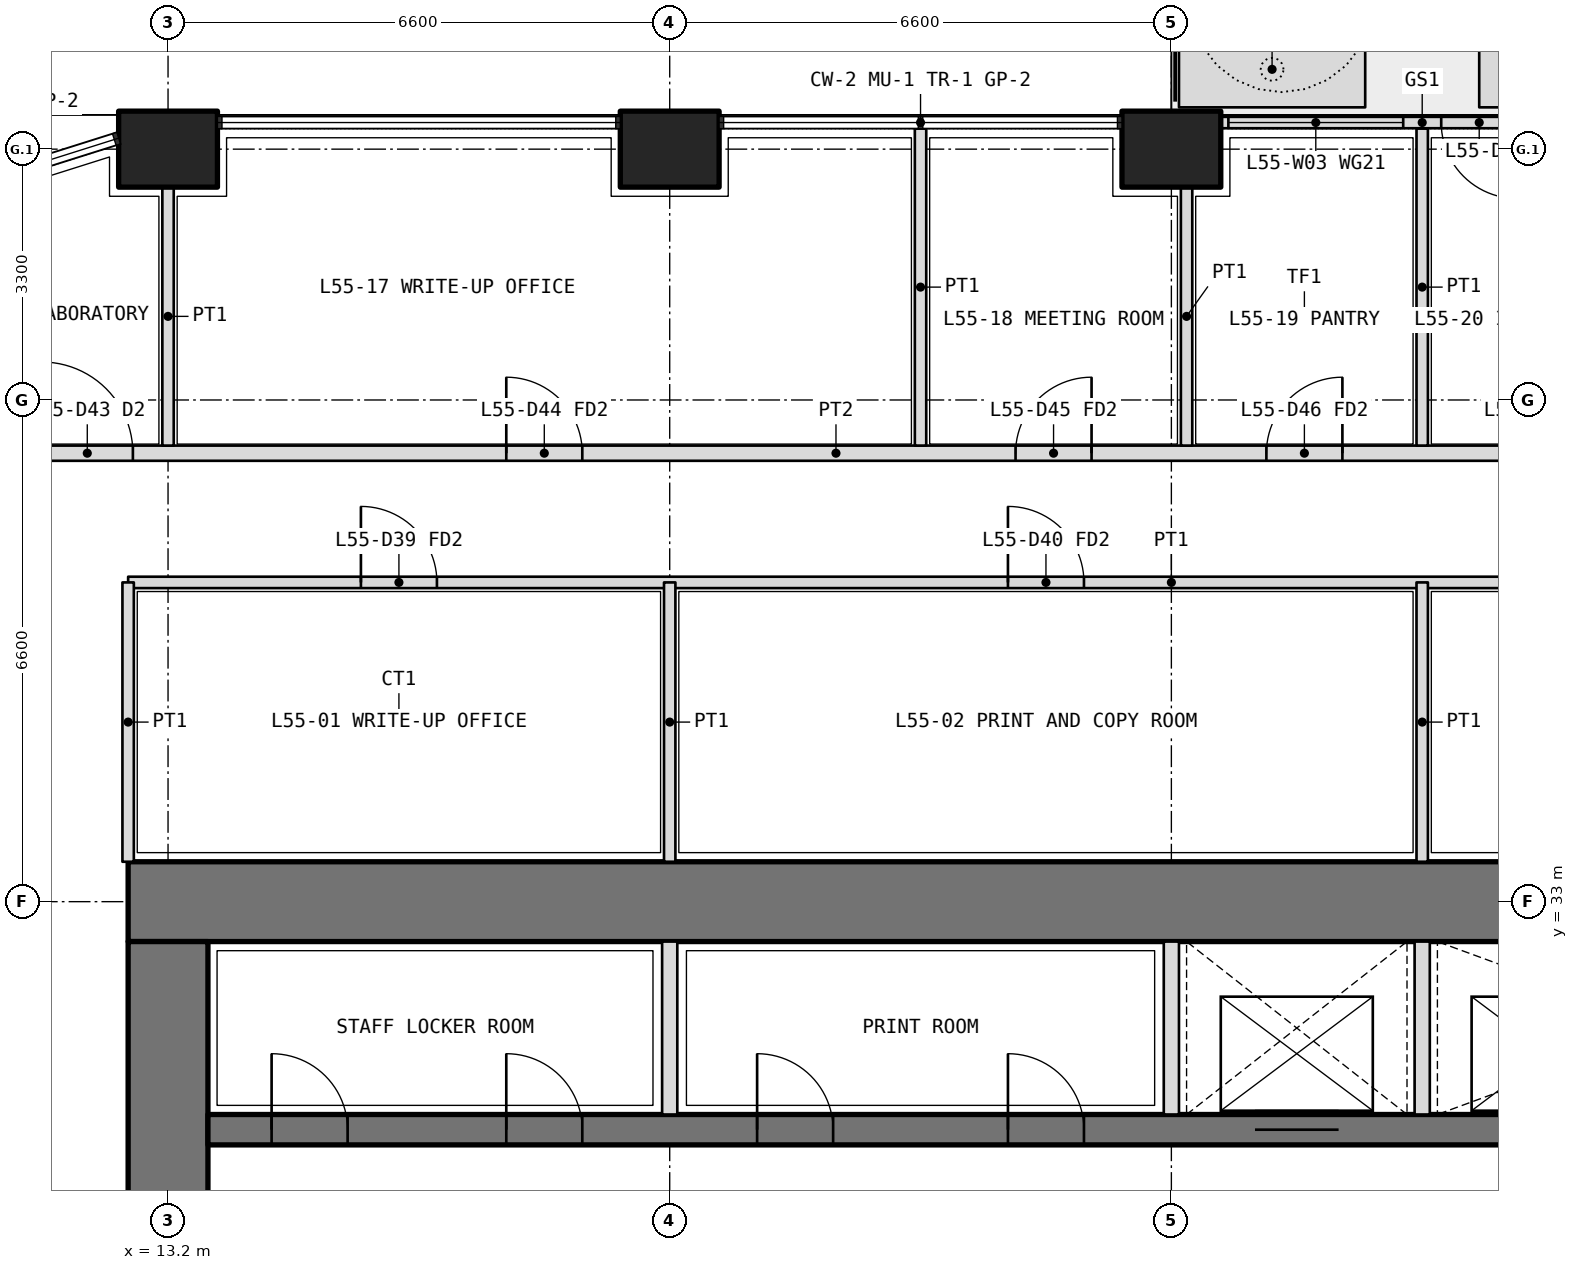
"""IFC4 building model, lengths in metres.
Left out: names, types, materials, properties, quantities, classifications, styles, units other than length and angle.
Written with IfcOpenShell. Run it as: python <this file> out.ifc"""

import sys

from ifc_helpers import new_model, si_unit, direction, frame, frame_2d, origin, origin_2d, place, context, subcontext, project, spatial, polyline, rectangle, outline, extrude, element, fill, save


model = new_model("IFC4")
c1 = context("Model", 3, precision=1e-05, world=origin(), true_north=direction((0.0, 1.0)))
c2 = subcontext(c1, "Body", "Model", "MODEL_VIEW")
j1 = project(units=[si_unit("LENGTHUNIT", "METRE"), si_unit("PLANEANGLEUNIT", "RADIAN")], contexts=[c1])
p1 = place(None, origin())
s1 = spatial("IfcSite", under=j1, at=p1, CompositionType="ELEMENT")
p2 = place(p1, origin())
s2 = spatial("IfcBuilding", under=s1, at=p2, CompositionType="ELEMENT")
p3 = place(p2, frame((0.0, 0.0, 241.8)))
s3 = spatial("IfcBuildingStorey", under=s2, at=p3, CompositionType="ELEMENT", Elevation=241.8)
for number, where, z_axis, x_axis in (
    (1, (13.2, 42.9, 0.0), (0.0, 0.0, 1.0), (1.0, 0.0, 0.0)),
    (2, (19.8, 42.9, 0.0), (0.0, 0.0, 1.0), (1.0, 0.0, 0.0)),
    (3, (26.4, 42.9, 0.0), (0.0, 0.0, 1.0), (1.0, 0.0, 0.0)),
):
    element("IfcColumn", number, at=place(p3, frame(where, z_axis=z_axis, x_axis=x_axis)), inside=s3, PredefinedType="COLUMN", context=c2, shape_type="SweptSolid", body=[
        extrude(rectangle(XDim=1.3, YDim=1.0, at=origin_2d()), origin(), (0.0, 0.0, 1.0), 4.2),
    ])
p4 = place(p3, origin())
e4 = element("IfcWall", 4, at=p4, inside=s3, PredefinedType="USERDEFINED", context=c2, shape_type="SweptSolid", body=[
    extrude(outline(polyline([(26.5, 43.45), (28.95, 43.45), (28.95, 44.45), (26.5, 44.45), (26.5, 43.45)]), holes=[polyline([(26.65, 43.6), (28.8, 43.6), (28.8, 44.3), (26.65, 44.3), (26.65, 43.6)])]), origin(), (0.0, 0.0, 1.0), 1.05),
])
p5 = place(p3, origin())
e5 = element("IfcWall", 5, at=p5, inside=s3, PredefinedType="USERDEFINED", context=c2, shape_type="SweptSolid", body=[
    extrude(outline(polyline([(30.45, 43.45), (39.5, 43.45), (39.5, 44.45), (30.45, 44.45), (30.45, 43.45)]), holes=[polyline([(30.6, 43.6), (39.35, 43.6), (39.35, 44.3), (30.6, 44.3), (30.6, 43.6)])]), origin(), (0.0, 0.0, 1.0), 1.05),
])
p6 = place(p3, frame((32.35, 43.25, 0.0), z_axis=(0.0, 0.0, 1.0), x_axis=(-1.0, 0.0, 0.0)))
e6 = element("IfcWall", 6, at=p6, inside=s3, PredefinedType="SOLIDWALL", context=c2, shape_type="SweptSolid", body=[
    extrude(rectangle(XDim=5.3, YDim=0.15, at=frame_2d((2.65, 0.0))), origin(), (0.0, 0.0, 1.0), 2.7),
])
p7 = place(p6, frame((1.4, 0.0, 0.0)))
e7 = element("IfcOpeningElement", 7, at=p7, cuts=e6, PredefinedType="OPENING", context=c2, shape_type="SweptSolid", body=[
    extrude(rectangle(XDim=1.0, YDim=2.4, at=frame_2d((0.5, 1.2))), frame((0.0, 0.085, 0.0), z_axis=(0.0, -1.0, 0.0), x_axis=(1.0, 0.0, 0.0)), (0.0, 0.0, 1.0), 0.17),
])
p8 = place(p6, frame((0.1, 0.0, 0.1)))
e8 = element("IfcOpeningElement", 8, at=p8, cuts=e6, PredefinedType="OPENING", context=c2, shape_type="SweptSolid", body=[
    extrude(rectangle(XDim=1.2, YDim=2.3, at=frame_2d((0.6, 1.15))), frame((0.0, 0.085, 0.0), z_axis=(0.0, -1.0, 0.0), x_axis=(1.0, 0.0, 0.0)), (0.0, 0.0, 1.0), 0.17),
])
p9 = place(p6, frame((2.9, 0.0, 0.1)))
e9 = element("IfcOpeningElement", 9, at=p9, cuts=e6, PredefinedType="OPENING", context=c2, shape_type="SweptSolid", body=[
    extrude(rectangle(XDim=2.3, YDim=2.3, at=frame_2d((1.15, 1.15))), frame((0.0, 0.085, 0.0), z_axis=(0.0, -1.0, 0.0), x_axis=(1.0, 0.0, 0.0)), (0.0, 0.0, 1.0), 0.17),
])
p10 = place(p3, frame((40.125, 33.0, 0.0), z_axis=(0.0, 0.0, 1.0), x_axis=(-1.0, 0.0, 0.0)))
e10 = element("IfcWall", 10, at=p10, inside=s3, PredefinedType="SHEAR", context=c2, shape_type="SweptSolid", body=[
    extrude(rectangle(XDim=27.45, YDim=1.05, at=frame_2d((13.725, 0.0))), origin(), (0.0, 0.0, 1.0), 4.2),
])
p11 = place(p3, frame((13.2, 32.475, 0.0), z_axis=(0.0, 0.0, 1.0), x_axis=(0.0, -1.0, 0.0)))
e11 = element("IfcWall", 11, at=p11, inside=s3, PredefinedType="SHEAR", context=c2, shape_type="SweptSolid", body=[
    extrude(rectangle(XDim=18.75, YDim=1.05, at=frame_2d((9.375, 0.0))), origin(), (0.0, 0.0, 1.0), 4.2),
])
p12 = place(p11, frame((14.125, 0.0, 0.0)))
e12 = element("IfcOpeningElement", 12, at=p12, cuts=e11, PredefinedType="OPENING", context=c2, shape_type="SweptSolid", body=[
    extrude(rectangle(XDim=1.6, YDim=2.1, at=frame_2d((0.8, 1.05))), frame((0.0, 0.535, 0.0), z_axis=(0.0, -1.0, 0.0), x_axis=(1.0, 0.0, 0.0)), (0.0, 0.0, 1.0), 1.07),
])
p13 = place(p11, frame((3.325, 0.0, 0.0)))
e13 = element("IfcOpeningElement", 13, at=p13, cuts=e11, PredefinedType="OPENING", context=c2, shape_type="SweptSolid", body=[
    extrude(rectangle(XDim=1.6, YDim=2.1, at=frame_2d((0.8, 1.05))), frame((0.0, 0.535, 0.0), z_axis=(0.0, -1.0, 0.0), x_axis=(1.0, 0.0, 0.0)), (0.0, 0.0, 1.0), 1.07),
])
p14 = place(p3, frame((13.725, 30.0, 0.0), z_axis=(0.0, 0.0, 1.0), x_axis=(1.0, 0.0, 0.0)))
e14 = element("IfcWall", 14, at=p14, inside=s3, PredefinedType="SHEAR", context=c2, shape_type="SweptSolid", body=[
    extrude(rectangle(XDim=25.35, YDim=0.4, at=frame_2d((12.675, 0.0))), origin(), (0.0, 0.0, 1.0), 4.2),
])
p15 = place(p14, frame((0.837, 0.0, 0.0)))
e15 = element("IfcOpeningElement", 15, at=p15, cuts=e14, PredefinedType="OPENING", context=c2, shape_type="SweptSolid", body=[
    extrude(rectangle(XDim=1.0, YDim=2.1, at=frame_2d((0.5, 1.05))), frame((0.0, 0.21, 0.0), z_axis=(0.0, -1.0, 0.0), x_axis=(1.0, 0.0, 0.0)), (0.0, 0.0, 1.0), 0.42),
])
p16 = place(p14, frame((3.925, 0.0, 0.0)))
e16 = element("IfcOpeningElement", 16, at=p16, cuts=e14, PredefinedType="OPENING", context=c2, shape_type="SweptSolid", body=[
    extrude(rectangle(XDim=1.0, YDim=2.1, at=frame_2d((0.5, 1.05))), frame((0.0, 0.21, 0.0), z_axis=(0.0, -1.0, 0.0), x_axis=(1.0, 0.0, 0.0)), (0.0, 0.0, 1.0), 0.42),
])
p17 = place(p14, frame((7.225, 0.0, 0.0)))
e17 = element("IfcOpeningElement", 17, at=p17, cuts=e14, PredefinedType="OPENING", context=c2, shape_type="SweptSolid", body=[
    extrude(rectangle(XDim=1.0, YDim=2.1, at=frame_2d((0.5, 1.05))), frame((0.0, 0.21, 0.0), z_axis=(0.0, -1.0, 0.0), x_axis=(1.0, 0.0, 0.0)), (0.0, 0.0, 1.0), 0.42),
])
p18 = place(p14, frame((10.525, 0.0, 0.0)))
e18 = element("IfcOpeningElement", 18, at=p18, cuts=e14, PredefinedType="OPENING", context=c2, shape_type="SweptSolid", body=[
    extrude(rectangle(XDim=1.0, YDim=2.1, at=frame_2d((0.5, 1.05))), frame((0.0, 0.21, 0.0), z_axis=(0.0, -1.0, 0.0), x_axis=(1.0, 0.0, 0.0)), (0.0, 0.0, 1.0), 0.42),
])
p19 = place(p14, frame((13.775, 0.0, 0.0)))
e19 = element("IfcOpeningElement", 19, at=p19, cuts=e14, PredefinedType="OPENING", context=c2, shape_type="SweptSolid", body=[
    extrude(rectangle(XDim=1.1, YDim=2.1, at=frame_2d((0.55, 1.05))), frame((0.0, 0.21, 0.0), z_axis=(0.0, -1.0, 0.0), x_axis=(1.0, 0.0, 0.0)), (0.0, 0.0, 1.0), 0.42),
])
p20 = place(p14, frame((17.075, 0.0, 0.0)))
e20 = element("IfcOpeningElement", 20, at=p20, cuts=e14, PredefinedType="OPENING", context=c2, shape_type="SweptSolid", body=[
    extrude(rectangle(XDim=1.1, YDim=2.1, at=frame_2d((0.55, 1.05))), frame((0.0, 0.21, 0.0), z_axis=(0.0, -1.0, 0.0), x_axis=(1.0, 0.0, 0.0)), (0.0, 0.0, 1.0), 0.42),
])
p21 = place(p14, frame((20.375, 0.0, 0.0)))
e21 = element("IfcOpeningElement", 21, at=p21, cuts=e14, PredefinedType="OPENING", context=c2, shape_type="SweptSolid", body=[
    extrude(rectangle(XDim=1.1, YDim=2.1, at=frame_2d((0.55, 1.05))), frame((0.0, 0.21, 0.0), z_axis=(0.0, -1.0, 0.0), x_axis=(1.0, 0.0, 0.0)), (0.0, 0.0, 1.0), 0.42),
])
p22 = place(p14, frame((23.462, 0.0, 0.0)))
e22 = element("IfcOpeningElement", 22, at=p22, cuts=e14, PredefinedType="OPENING", context=c2, shape_type="SweptSolid", body=[
    extrude(rectangle(XDim=1.1, YDim=2.1, at=frame_2d((0.55, 1.05))), frame((0.0, 0.21, 0.0), z_axis=(0.0, -1.0, 0.0), x_axis=(1.0, 0.0, 0.0)), (0.0, 0.0, 1.0), 0.42),
])
for number, where, z_axis, x_axis in (
    (23, (19.8, 30.2, 0.0), (0.0, 0.0, 1.0), (0.0, 1.0, 0.0)),
    (24, (26.4, 30.2, 0.0), (0.0, 0.0, 1.0), (0.0, 1.0, 0.0)),
    (25, (29.7, 30.2, 0.0), (0.0, 0.0, 1.0), (0.0, 1.0, 0.0)),
):
    element("IfcWall", number, at=place(p3, frame(where, z_axis=z_axis, x_axis=x_axis)), inside=s3, PredefinedType="PARTITIONING", context=c2, shape_type="SweptSolid", body=[
        extrude(rectangle(XDim=2.275, YDim=0.2, at=frame_2d((1.138, 0.0))), origin(), (0.0, 0.0, 1.0), 4.2),
    ])
p23 = place(p3, frame((12.675, 37.2, 0.0), z_axis=(0.0, 0.0, 1.0), x_axis=(1.0, 0.0, 0.0)))
e26 = element("IfcWall", 26, at=p23, inside=s3, PredefinedType="PARTITIONING", context=c2, shape_type="SweptSolid", body=[
    extrude(rectangle(XDim=27.45, YDim=0.15, at=frame_2d((13.725, 0.0))), origin(), (0.0, 0.0, 1.0), 3.0),
])
p24 = place(p23, frame((3.062, 0.0, 0.0)))
e27 = element("IfcOpeningElement", 27, at=p24, cuts=e26, PredefinedType="OPENING", context=c2, shape_type="SweptSolid", body=[
    extrude(rectangle(XDim=1.0, YDim=2.1, at=frame_2d((0.5, 1.05))), frame((0.0, 0.085, 0.0), z_axis=(0.0, -1.0, 0.0), x_axis=(1.0, 0.0, 0.0)), (0.0, 0.0, 1.0), 0.17),
])
p25 = place(p23, frame((11.575, 0.0, 0.0)))
e28 = element("IfcOpeningElement", 28, at=p25, cuts=e26, PredefinedType="OPENING", context=c2, shape_type="SweptSolid", body=[
    extrude(rectangle(XDim=1.0, YDim=2.1, at=frame_2d((0.5, 1.05))), frame((0.0, 0.085, 0.0), z_axis=(0.0, -1.0, 0.0), x_axis=(1.0, 0.0, 0.0)), (0.0, 0.0, 1.0), 0.17),
])
p26 = place(p23, frame((19.825, 0.0, 0.0)))
e29 = element("IfcOpeningElement", 29, at=p26, cuts=e26, PredefinedType="OPENING", context=c2, shape_type="SweptSolid", body=[
    extrude(rectangle(XDim=1.0, YDim=2.1, at=frame_2d((0.5, 1.05))), frame((0.0, 0.085, 0.0), z_axis=(0.0, -1.0, 0.0), x_axis=(1.0, 0.0, 0.0)), (0.0, 0.0, 1.0), 0.17),
])
p27 = place(p23, frame((25.038, 0.0, 0.0)))
e30 = element("IfcOpeningElement", 30, at=p27, cuts=e26, PredefinedType="OPENING", context=c2, shape_type="SweptSolid", body=[
    extrude(rectangle(XDim=1.0, YDim=2.1, at=frame_2d((0.5, 1.05))), frame((0.0, 0.085, 0.0), z_axis=(0.0, -1.0, 0.0), x_axis=(1.0, 0.0, 0.0)), (0.0, 0.0, 1.0), 0.17),
])
for number, where, z_axis, x_axis in (
    (31, (12.675, 33.525, 0.0), (0.0, 0.0, 1.0), (0.0, 1.0, 0.0)),
    (32, (19.8, 33.525, 0.0), (0.0, 0.0, 1.0), (0.0, 1.0, 0.0)),
):
    element("IfcWall", number, at=place(p3, frame(where, z_axis=z_axis, x_axis=x_axis)), inside=s3, PredefinedType="PARTITIONING", context=c2, shape_type="SweptSolid", body=[
        extrude(rectangle(XDim=3.675, YDim=0.15, at=frame_2d((1.837, 0.0))), origin(), (0.0, 0.0, 1.0), 3.0),
    ])
p28 = place(p3, frame((29.7, 33.525, 0.0), z_axis=(0.0, 0.0, 1.0), x_axis=(0.0, 1.0, 0.0)))
e33 = element("IfcWall", 33, at=p28, inside=s3, PredefinedType="PARTITIONING", context=c2, shape_type="SweptSolid", body=[
    extrude(rectangle(XDim=3.675, YDim=0.15, at=frame_2d((1.837, 0.0))), origin(), (0.0, 0.0, 1.0), 3.9),
])
p29 = place(p3, frame((10.975, 38.9, 0.0), z_axis=(0.0, 0.0, 1.0), x_axis=(1.0, 0.0, 0.0)))
e34 = element("IfcWall", 34, at=p29, inside=s3, PredefinedType="PARTITIONING", context=c2, shape_type="SweptSolid", body=[
    extrude(rectangle(XDim=22.025, YDim=0.2, at=frame_2d((11.012, 0.0))), origin(), (0.0, 0.0, 1.0), 3.0),
])
p30 = place(p29, frame((0.562, 0.0, 0.0)))
e35 = element("IfcOpeningElement", 35, at=p30, cuts=e34, PredefinedType="OPENING", context=c2, shape_type="SweptSolid", body=[
    extrude(rectangle(XDim=1.2, YDim=2.1, at=frame_2d((0.6, 1.05))), frame((0.0, 0.11, 0.0), z_axis=(0.0, -1.0, 0.0), x_axis=(1.0, 0.0, 0.0)), (0.0, 0.0, 1.0), 0.22),
])
p31 = place(p29, frame((6.675, 0.0, 0.0)))
e36 = element("IfcOpeningElement", 36, at=p31, cuts=e34, PredefinedType="OPENING", context=c2, shape_type="SweptSolid", body=[
    extrude(rectangle(XDim=1.0, YDim=2.1, at=frame_2d((0.5, 1.05))), frame((0.0, 0.11, 0.0), z_axis=(0.0, -1.0, 0.0), x_axis=(1.0, 0.0, 0.0)), (0.0, 0.0, 1.0), 0.22),
])
p32 = place(p29, frame((13.375, 0.0, 0.0)))
e37 = element("IfcOpeningElement", 37, at=p32, cuts=e34, PredefinedType="OPENING", context=c2, shape_type="SweptSolid", body=[
    extrude(rectangle(XDim=1.0, YDim=2.1, at=frame_2d((0.5, 1.05))), frame((0.0, 0.11, 0.0), z_axis=(0.0, -1.0, 0.0), x_axis=(1.0, 0.0, 0.0)), (0.0, 0.0, 1.0), 0.22),
])
p33 = place(p29, frame((16.675, 0.0, 0.0)))
e38 = element("IfcOpeningElement", 38, at=p33, cuts=e34, PredefinedType="OPENING", context=c2, shape_type="SweptSolid", body=[
    extrude(rectangle(XDim=1.0, YDim=2.1, at=frame_2d((0.5, 1.05))), frame((0.0, 0.11, 0.0), z_axis=(0.0, -1.0, 0.0), x_axis=(1.0, 0.0, 0.0)), (0.0, 0.0, 1.0), 0.22),
])
p34 = place(p29, frame((19.875, 0.0, 0.0)))
e39 = element("IfcOpeningElement", 39, at=p34, cuts=e34, PredefinedType="OPENING", context=c2, shape_type="SweptSolid", body=[
    extrude(rectangle(XDim=1.0, YDim=2.1, at=frame_2d((0.5, 1.05))), frame((0.0, 0.11, 0.0), z_axis=(0.0, -1.0, 0.0), x_axis=(1.0, 0.0, 0.0)), (0.0, 0.0, 1.0), 0.22),
])
p35 = place(p3, frame((26.6, 42.4, 0.0), z_axis=(0.0, 0.0, 1.0), x_axis=(0.0, -1.0, 0.0)))
e40 = element("IfcWall", 40, at=p35, inside=s3, PredefinedType="PARTITIONING", context=c2, shape_type="SweptSolid", body=[
    extrude(rectangle(XDim=3.4, YDim=0.15, at=frame_2d((1.7, 0.0))), origin(), (0.0, 0.0, 1.0), 3.0),
])
p36 = place(p3, frame((29.7, 43.17, 0.0), z_axis=(0.0, 0.0, 1.0), x_axis=(0.0, -1.0, 0.0)))
e41 = element("IfcWall", 41, at=p36, inside=s3, PredefinedType="PARTITIONING", context=c2, shape_type="SweptSolid", body=[
    extrude(rectangle(XDim=4.17, YDim=0.15, at=frame_2d((2.085, 0.0))), origin(), (0.0, 0.0, 1.0), 2.7),
])
p37 = place(p3, frame((13.2, 42.4, 0.0), z_axis=(0.0, 0.0, 1.0), x_axis=(0.0, -1.0, 0.0)))
e42 = element("IfcWall", 42, at=p37, inside=s3, PredefinedType="PARTITIONING", context=c2, shape_type="SweptSolid", body=[
    extrude(rectangle(XDim=3.4, YDim=0.15, at=frame_2d((1.7, 0.0))), origin(), (0.0, 0.0, 1.0), 3.0),
])
p38 = place(p3, frame((23.1, 43.17, 0.0), z_axis=(0.0, 0.0, 1.0), x_axis=(0.0, -1.0, 0.0)))
e43 = element("IfcWall", 43, at=p38, inside=s3, PredefinedType="PARTITIONING", context=c2, shape_type="SweptSolid", body=[
    extrude(rectangle(XDim=4.17, YDim=0.15, at=frame_2d((2.085, 0.0))), origin(), (0.0, 0.0, 1.0), 2.7),
])
p39 = place(p7, origin())
e44 = element("IfcDoor", 44, at=p39, inside=s3, OperationType="SINGLE_SWING_LEFT", PredefinedType="DOOR", context=c2, shape_type="SweptSolid", body=[
    extrude(rectangle(XDim=1.0, YDim=2.4, at=frame_2d((0.5, 1.2))), frame((0.0, 0.025, 0.0), z_axis=(0.0, -1.0, 0.0), x_axis=(1.0, 0.0, 0.0)), (0.0, 0.0, 1.0), 0.05),
])
fill(e7, e44)
p40 = place(p9, origin())
e45 = element("IfcWindow", 45, at=p40, inside=s3, PartitioningType="SINGLE_PANEL", PredefinedType="WINDOW", context=c2, shape_type="SweptSolid", body=[
    extrude(rectangle(XDim=2.3, YDim=2.3, at=frame_2d((1.15, 1.15))), frame((0.0, 0.03, 0.0), z_axis=(0.0, -1.0, 0.0), x_axis=(1.0, 0.0, 0.0)), (0.0, 0.0, 1.0), 0.06),
])
fill(e9, e45)
p41 = place(p24, origin())
e46 = element("IfcDoor", 46, at=p41, inside=s3, OperationType="SINGLE_SWING_LEFT", PredefinedType="DOOR", context=c2, shape_type="SweptSolid", body=[
    extrude(rectangle(XDim=1.0, YDim=2.1, at=frame_2d((0.5, 1.05))), frame((0.0, 0.025, 0.0), z_axis=(0.0, -1.0, 0.0), x_axis=(1.0, 0.0, 0.0)), (0.0, 0.0, 1.0), 0.05),
])
fill(e27, e46)
p42 = place(p25, origin())
e47 = element("IfcDoor", 47, at=p42, inside=s3, OperationType="SINGLE_SWING_LEFT", PredefinedType="DOOR", context=c2, shape_type="SweptSolid", body=[
    extrude(rectangle(XDim=1.0, YDim=2.1, at=frame_2d((0.5, 1.05))), frame((0.0, 0.025, 0.0), z_axis=(0.0, -1.0, 0.0), x_axis=(1.0, 0.0, 0.0)), (0.0, 0.0, 1.0), 0.05),
])
fill(e28, e47)
p43 = place(p30, origin())
e48 = element("IfcDoor", 48, at=p43, inside=s3, OperationType="DOUBLE_DOOR_SINGLE_SWING", PredefinedType="DOOR", context=c2, shape_type="SweptSolid", body=[
    extrude(rectangle(XDim=1.2, YDim=2.1, at=frame_2d((0.6, 1.05))), frame((0.0, 0.025, 0.0), z_axis=(0.0, -1.0, 0.0), x_axis=(1.0, 0.0, 0.0)), (0.0, 0.0, 1.0), 0.05),
])
fill(e35, e48)
p44 = place(p31, origin())
e49 = element("IfcDoor", 49, at=p44, inside=s3, OperationType="SINGLE_SWING_LEFT", PredefinedType="DOOR", context=c2, shape_type="SweptSolid", body=[
    extrude(rectangle(XDim=1.0, YDim=2.1, at=frame_2d((0.5, 1.05))), frame((0.0, 0.025, 0.0), z_axis=(0.0, -1.0, 0.0), x_axis=(1.0, 0.0, 0.0)), (0.0, 0.0, 1.0), 0.05),
])
fill(e36, e49)
p45 = place(p32, origin())
e50 = element("IfcDoor", 50, at=p45, inside=s3, OperationType="SINGLE_SWING_RIGHT", PredefinedType="DOOR", context=c2, shape_type="SweptSolid", body=[
    extrude(rectangle(XDim=1.0, YDim=2.1, at=frame_2d((0.5, 1.05))), frame((0.0, 0.025, 0.0), z_axis=(0.0, -1.0, 0.0), x_axis=(1.0, 0.0, 0.0)), (0.0, 0.0, 1.0), 0.05),
])
fill(e37, e50)
p46 = place(p33, origin())
e51 = element("IfcDoor", 51, at=p46, inside=s3, OperationType="SINGLE_SWING_RIGHT", PredefinedType="DOOR", context=c2, shape_type="SweptSolid", body=[
    extrude(rectangle(XDim=1.0, YDim=2.1, at=frame_2d((0.5, 1.05))), frame((0.0, 0.025, 0.0), z_axis=(0.0, -1.0, 0.0), x_axis=(1.0, 0.0, 0.0)), (0.0, 0.0, 1.0), 0.05),
])
fill(e38, e51)
p47 = place(p15, origin())
e52 = element("IfcDoor", 52, at=p47, inside=s3, OperationType="SINGLE_SWING_LEFT", PredefinedType="DOOR", context=c2, shape_type="SweptSolid", body=[
    extrude(rectangle(XDim=1.0, YDim=2.1, at=frame_2d((0.5, 1.05))), frame((0.0, 0.025, 0.0), z_axis=(0.0, -1.0, 0.0), x_axis=(1.0, 0.0, 0.0)), (0.0, 0.0, 1.0), 0.05),
])
fill(e15, e52)
p48 = place(p16, origin())
e53 = element("IfcDoor", 53, at=p48, inside=s3, OperationType="SINGLE_SWING_LEFT", PredefinedType="DOOR", context=c2, shape_type="SweptSolid", body=[
    extrude(rectangle(XDim=1.0, YDim=2.1, at=frame_2d((0.5, 1.05))), frame((0.0, 0.025, 0.0), z_axis=(0.0, -1.0, 0.0), x_axis=(1.0, 0.0, 0.0)), (0.0, 0.0, 1.0), 0.05),
])
fill(e16, e53)
p49 = place(p17, origin())
e54 = element("IfcDoor", 54, at=p49, inside=s3, OperationType="SINGLE_SWING_LEFT", PredefinedType="DOOR", context=c2, shape_type="SweptSolid", body=[
    extrude(rectangle(XDim=1.0, YDim=2.1, at=frame_2d((0.5, 1.05))), frame((0.0, 0.025, 0.0), z_axis=(0.0, -1.0, 0.0), x_axis=(1.0, 0.0, 0.0)), (0.0, 0.0, 1.0), 0.05),
])
fill(e17, e54)
p50 = place(p18, origin())
e55 = element("IfcDoor", 55, at=p50, inside=s3, OperationType="SINGLE_SWING_LEFT", PredefinedType="DOOR", context=c2, shape_type="SweptSolid", body=[
    extrude(rectangle(XDim=1.0, YDim=2.1, at=frame_2d((0.5, 1.05))), frame((0.0, 0.025, 0.0), z_axis=(0.0, -1.0, 0.0), x_axis=(1.0, 0.0, 0.0)), (0.0, 0.0, 1.0), 0.05),
])
fill(e18, e55)
p51 = place(p19, origin())
e56 = element("IfcDoor", 56, at=p51, inside=s3, OperationType="DOUBLE_DOOR_SLIDING", PredefinedType="DOOR", context=c2, shape_type="SweptSolid", body=[
    extrude(rectangle(XDim=1.1, YDim=2.1, at=frame_2d((0.55, 1.05))), frame((0.0, 0.025, 0.0), z_axis=(0.0, -1.0, 0.0), x_axis=(1.0, 0.0, 0.0)), (0.0, 0.0, 1.0), 0.05),
])
fill(e19, e56)
save(model, sys.argv[1])
